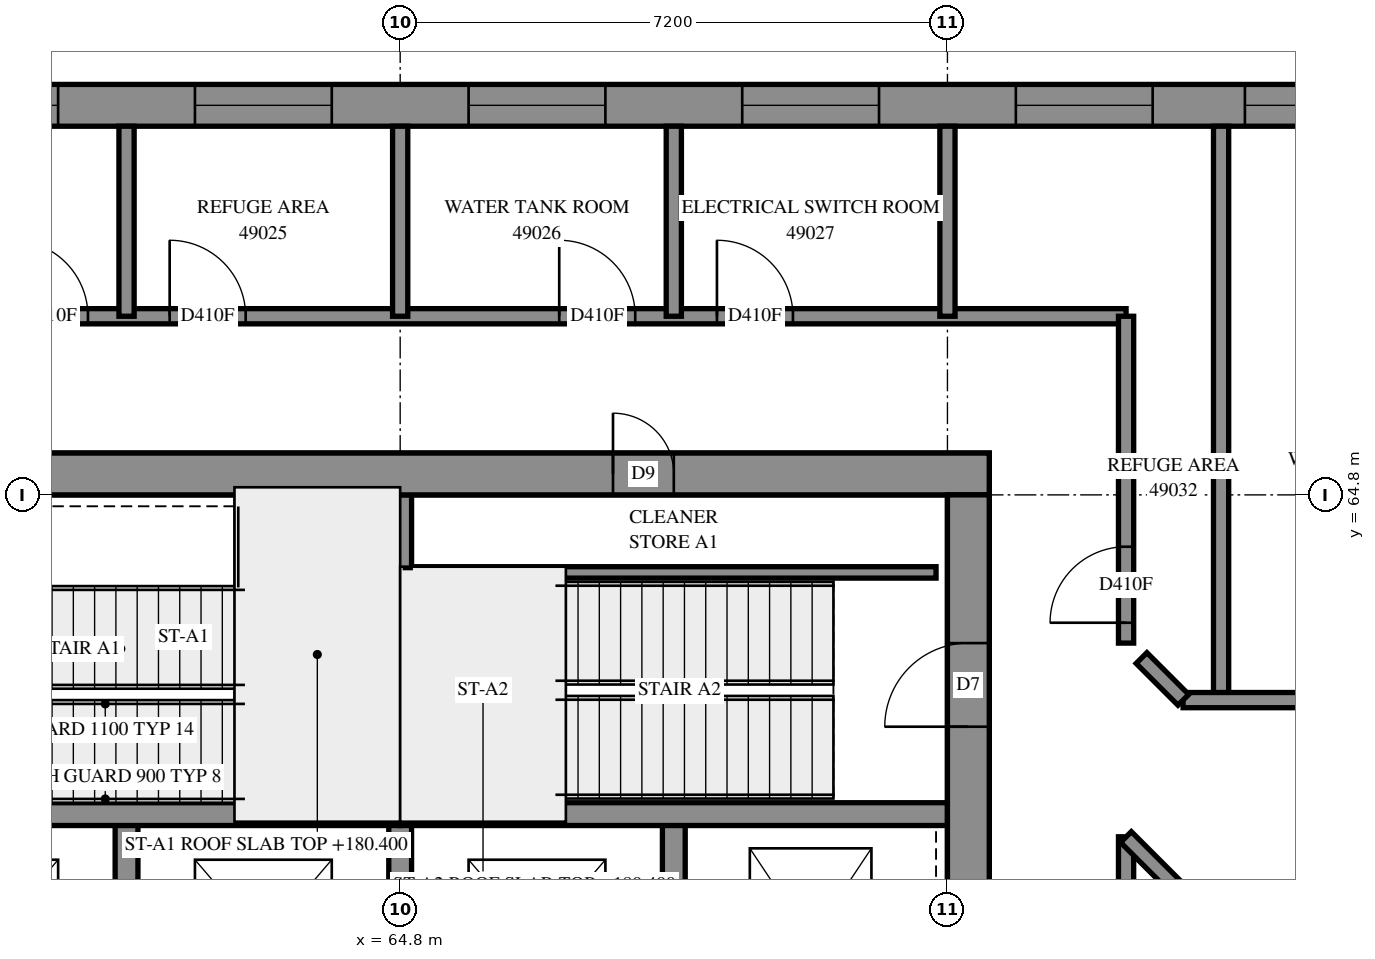
"""IFC4 building model, lengths in metres.
Left out: names, types, materials, properties, quantities, classifications, styles, units other than length and angle.
Written with IfcOpenShell. Run it as: python <this file> out.ifc"""

import sys

from ifc_helpers import new_model, si_unit, direction, frame, frame_2d, origin, place, context, subcontext, project, spatial, polyline, rectangle, outline, extrude, element, fill, save


model = new_model("IFC4")
c1 = context("Model", 3, precision=1e-05, world=origin(), true_north=direction((0.0, 1.0)))
c2 = subcontext(c1, "Body", "Model", "MODEL_VIEW")
j1 = project(units=[si_unit("LENGTHUNIT", "METRE"), si_unit("PLANEANGLEUNIT", "RADIAN")], contexts=[c1])
p1 = place(None, origin())
s1 = spatial("IfcSite", under=j1, at=p1, CompositionType="ELEMENT")
p2 = place(p1, origin())
s2 = spatial("IfcBuilding", under=s1, at=p2, CompositionType="ELEMENT")
p3 = place(p2, frame((0.0, 0.0, 180.4)))
s3 = spatial("IfcBuildingStorey", under=s2, at=p3, CompositionType="ELEMENT", Elevation=180.4)
p4 = place(p3, frame((57.05, 65.075, -0.3), z_axis=(0.0, 0.0, 1.0), x_axis=(1.0, 0.0, 0.0)))
e1 = element("IfcWall", 1, at=p4, inside=s3, PredefinedType="SHEAR", context=c2, shape_type="SweptSolid", body=[
    extrude(rectangle(XDim=15.5, YDim=0.55, at=frame_2d((7.75, 0.0))), origin(), (0.0, 0.0, 1.0), 4.3),
])
p5 = place(p4, frame((10.55, 0.0, 0.3)))
e2 = element("IfcOpeningElement", 2, at=p5, cuts=e1, PredefinedType="OPENING", context=c2, shape_type="SweptSolid", body=[
    extrude(rectangle(XDim=0.8, YDim=2.1, at=frame_2d((0.4, 1.05))), frame((0.0, 0.285, 0.0), z_axis=(0.0, -1.0, 0.0), x_axis=(1.0, 0.0, 0.0)), (0.0, 0.0, 1.0), 0.57),
])
p6 = place(p3, frame((72.275, 50.4, -0.3), z_axis=(0.0, 0.0, 1.0), x_axis=(0.0, 1.0, 0.0)))
e3 = element("IfcWall", 3, at=p6, inside=s3, PredefinedType="SHEAR", context=c2, shape_type="SweptSolid", body=[
    extrude(rectangle(XDim=14.4, YDim=0.55, at=frame_2d((7.2, 0.0))), origin(), (0.0, 0.0, 1.0), 4.3),
])
p7 = place(p6, frame((4.55, 0.0, 0.3)))
e4 = element("IfcOpeningElement", 4, at=p7, cuts=e3, PredefinedType="OPENING", context=c2, shape_type="SweptSolid", body=[
    extrude(rectangle(XDim=1.1, YDim=2.1, at=frame_2d((0.55, 1.05))), frame((0.0, 0.285, 0.0), z_axis=(0.0, -1.0, 0.0), x_axis=(1.0, 0.0, 0.0)), (0.0, 0.0, 1.0), 0.57),
])
p8 = place(p6, frame((11.35, 0.0, 0.3)))
e5 = element("IfcOpeningElement", 5, at=p8, cuts=e3, PredefinedType="OPENING", context=c2, shape_type="SweptSolid", body=[
    extrude(rectangle(XDim=1.1, YDim=2.1, at=frame_2d((0.55, 1.05))), frame((0.0, 0.285, 0.0), z_axis=(0.0, -1.0, 0.0), x_axis=(1.0, 0.0, 0.0)), (0.0, 0.0, 1.0), 0.57),
])
for number, where, z_axis, x_axis in (
    (6, (61.2, 57.3, 0.0), (0.0, 0.0, 1.0), (0.0, 1.0, 0.0)),
    (7, (64.8, 57.3, 0.0), (0.0, 0.0, 1.0), (0.0, 1.0, 0.0)),
    (8, (68.4, 57.3, 0.0), (0.0, 0.0, 1.0), (0.0, 1.0, 0.0)),
):
    element("IfcWall", number, at=place(p3, frame(where, z_axis=z_axis, x_axis=x_axis)), inside=s3, PredefinedType="SOLIDWALL", context=c2, shape_type="SweptSolid", body=[
        extrude(rectangle(XDim=3.3, YDim=0.3, at=frame_2d((1.65, 0.0))), origin(), (0.0, 0.0, 1.0), 4.7),
    ])
for number, where, z_axis, x_axis in (
    (9, (57.6, 60.6, 0.0), (0.0, 0.0, 1.0), (1.0, 0.0, 0.0)),
    (10, (64.8, 60.6, 0.0), (0.0, 0.0, 1.0), (1.0, 0.0, 0.0)),
):
    element("IfcWall", number, at=place(p3, frame(where, z_axis=z_axis, x_axis=x_axis)), inside=s3, PredefinedType="SOLIDWALL", context=c2, shape_type="SweptSolid", body=[
        extrude(rectangle(XDim=7.2, YDim=0.3, at=frame_2d((3.6, 0.0))), origin(), (0.0, 0.0, 1.0), 4.7),
    ])
p9 = place(p3, frame((64.8, 60.6, 0.0), z_axis=(0.0, 0.0, 1.0), x_axis=(0.0, 1.0, 0.0)))
e11 = element("IfcWall", 11, at=p9, inside=s3, PredefinedType="SOLIDWALL", context=c2, shape_type="SweptSolid", body=[
    extrude(rectangle(XDim=4.2, YDim=0.3, at=frame_2d((2.1, 0.0))), origin(), (0.0, 0.0, 1.0), 4.7),
])
p10 = place(p3, frame((78.341, 69.925, 0.0), z_axis=(0.0, 0.0, 1.0), x_axis=(-1.0, 0.0, 0.0)))
e12 = element("IfcWall", 12, at=p10, inside=s3, PredefinedType="SOLIDWALL", context=c2, shape_type="SweptSolid", body=[
    extrude(outline(polyline([(-0.114, -0.275), (54.941, -0.275), (54.391, 0.275), (0.114, 0.275), (-0.114, -0.275)])), origin(), (0.0, 0.0, 1.0), 4.7),
])
p11 = place(p10, frame((0.627, 0.0, 0.9)))
e13 = element("IfcOpeningElement", 13, at=p11, cuts=e12, PredefinedType="OPENING", context=c2, shape_type="SweptSolid", body=[
    extrude(rectangle(XDim=1.8, YDim=3.6, at=frame_2d((0.9, 1.8))), frame((0.0, 0.285, 0.0), z_axis=(0.0, -1.0, 0.0), x_axis=(1.0, 0.0, 0.0)), (0.0, 0.0, 1.0), 0.57),
])
p12 = place(p10, frame((3.64, 0.0, 0.9)))
e14 = element("IfcOpeningElement", 14, at=p12, cuts=e12, PredefinedType="OPENING", context=c2, shape_type="SweptSolid", body=[
    extrude(rectangle(XDim=1.8, YDim=3.6, at=frame_2d((0.9, 1.8))), frame((0.0, 0.285, 0.0), z_axis=(0.0, -1.0, 0.0), x_axis=(1.0, 0.0, 0.0)), (0.0, 0.0, 1.0), 0.57),
])
p13 = place(p10, frame((7.24, 0.0, 0.9)))
e15 = element("IfcOpeningElement", 15, at=p13, cuts=e12, PredefinedType="OPENING", context=c2, shape_type="SweptSolid", body=[
    extrude(rectangle(XDim=1.8, YDim=3.6, at=frame_2d((0.9, 1.8))), frame((0.0, 0.285, 0.0), z_axis=(0.0, -1.0, 0.0), x_axis=(1.0, 0.0, 0.0)), (0.0, 0.0, 1.0), 0.57),
])
p14 = place(p10, frame((10.841, 0.0, 0.9)))
e16 = element("IfcOpeningElement", 16, at=p14, cuts=e12, PredefinedType="OPENING", context=c2, shape_type="SweptSolid", body=[
    extrude(rectangle(XDim=1.8, YDim=3.6, at=frame_2d((0.9, 1.8))), frame((0.0, 0.285, 0.0), z_axis=(0.0, -1.0, 0.0), x_axis=(1.0, 0.0, 0.0)), (0.0, 0.0, 1.0), 0.57),
])
p15 = place(p10, frame((14.441, 0.0, 0.9)))
e17 = element("IfcOpeningElement", 17, at=p15, cuts=e12, PredefinedType="OPENING", context=c2, shape_type="SweptSolid", body=[
    extrude(rectangle(XDim=1.8, YDim=3.6, at=frame_2d((0.9, 1.8))), frame((0.0, 0.285, 0.0), z_axis=(0.0, -1.0, 0.0), x_axis=(1.0, 0.0, 0.0)), (0.0, 0.0, 1.0), 0.57),
])
p16 = place(p10, frame((18.041, 0.0, 0.9)))
e18 = element("IfcOpeningElement", 18, at=p16, cuts=e12, PredefinedType="OPENING", context=c2, shape_type="SweptSolid", body=[
    extrude(rectangle(XDim=1.8, YDim=3.6, at=frame_2d((0.9, 1.8))), frame((0.0, 0.285, 0.0), z_axis=(0.0, -1.0, 0.0), x_axis=(1.0, 0.0, 0.0)), (0.0, 0.0, 1.0), 0.57),
])
p17 = place(p10, frame((21.64, 0.0, 0.9)))
e19 = element("IfcOpeningElement", 19, at=p17, cuts=e12, PredefinedType="OPENING", context=c2, shape_type="SweptSolid", body=[
    extrude(rectangle(XDim=1.8, YDim=3.6, at=frame_2d((0.9, 1.8))), frame((0.0, 0.285, 0.0), z_axis=(0.0, -1.0, 0.0), x_axis=(1.0, 0.0, 0.0)), (0.0, 0.0, 1.0), 0.57),
])
p18 = place(p10, frame((25.241, 0.0, 0.9)))
e20 = element("IfcOpeningElement", 20, at=p18, cuts=e12, PredefinedType="OPENING", context=c2, shape_type="SweptSolid", body=[
    extrude(rectangle(XDim=1.8, YDim=3.6, at=frame_2d((0.9, 1.8))), frame((0.0, 0.285, 0.0), z_axis=(0.0, -1.0, 0.0), x_axis=(1.0, 0.0, 0.0)), (0.0, 0.0, 1.0), 0.57),
])
p19 = place(p10, frame((28.84, 0.0, 0.9)))
e21 = element("IfcOpeningElement", 21, at=p19, cuts=e12, PredefinedType="OPENING", context=c2, shape_type="SweptSolid", body=[
    extrude(rectangle(XDim=1.8, YDim=3.6, at=frame_2d((0.9, 1.8))), frame((0.0, 0.285, 0.0), z_axis=(0.0, -1.0, 0.0), x_axis=(1.0, 0.0, 0.0)), (0.0, 0.0, 1.0), 0.57),
])
p20 = place(p10, frame((32.441, 0.0, 0.9)))
e22 = element("IfcOpeningElement", 22, at=p20, cuts=e12, PredefinedType="OPENING", context=c2, shape_type="SweptSolid", body=[
    extrude(rectangle(XDim=1.8, YDim=3.6, at=frame_2d((0.9, 1.8))), frame((0.0, 0.285, 0.0), z_axis=(0.0, -1.0, 0.0), x_axis=(1.0, 0.0, 0.0)), (0.0, 0.0, 1.0), 0.57),
])
p21 = place(p10, frame((36.041, 0.0, 0.9)))
e23 = element("IfcOpeningElement", 23, at=p21, cuts=e12, PredefinedType="OPENING", context=c2, shape_type="SweptSolid", body=[
    extrude(rectangle(XDim=1.8, YDim=3.6, at=frame_2d((0.9, 1.8))), frame((0.0, 0.285, 0.0), z_axis=(0.0, -1.0, 0.0), x_axis=(1.0, 0.0, 0.0)), (0.0, 0.0, 1.0), 0.57),
])
p22 = place(p10, frame((39.641, 0.0, 0.9)))
e24 = element("IfcOpeningElement", 24, at=p22, cuts=e12, PredefinedType="OPENING", context=c2, shape_type="SweptSolid", body=[
    extrude(rectangle(XDim=1.8, YDim=3.6, at=frame_2d((0.9, 1.8))), frame((0.0, 0.285, 0.0), z_axis=(0.0, -1.0, 0.0), x_axis=(1.0, 0.0, 0.0)), (0.0, 0.0, 1.0), 0.57),
])
p23 = place(p10, frame((43.24, 0.0, 0.9)))
e25 = element("IfcOpeningElement", 25, at=p23, cuts=e12, PredefinedType="OPENING", context=c2, shape_type="SweptSolid", body=[
    extrude(rectangle(XDim=1.8, YDim=3.6, at=frame_2d((0.9, 1.8))), frame((0.0, 0.285, 0.0), z_axis=(0.0, -1.0, 0.0), x_axis=(1.0, 0.0, 0.0)), (0.0, 0.0, 1.0), 0.57),
])
p24 = place(p10, frame((46.84, 0.0, 0.9)))
e26 = element("IfcOpeningElement", 26, at=p24, cuts=e12, PredefinedType="OPENING", context=c2, shape_type="SweptSolid", body=[
    extrude(rectangle(XDim=1.8, YDim=3.6, at=frame_2d((0.9, 1.8))), frame((0.0, 0.285, 0.0), z_axis=(0.0, -1.0, 0.0), x_axis=(1.0, 0.0, 0.0)), (0.0, 0.0, 1.0), 0.57),
])
p25 = place(p10, frame((50.441, 0.0, 0.9)))
e27 = element("IfcOpeningElement", 27, at=p25, cuts=e12, PredefinedType="OPENING", context=c2, shape_type="SweptSolid", body=[
    extrude(rectangle(XDim=1.8, YDim=3.6, at=frame_2d((0.9, 1.8))), frame((0.0, 0.285, 0.0), z_axis=(0.0, -1.0, 0.0), x_axis=(1.0, 0.0, 0.0)), (0.0, 0.0, 1.0), 0.57),
])
p26 = place(p3, frame((64.95, 63.78, 0.0), z_axis=(0.0, 0.0, 1.0), x_axis=(1.0, 0.0, 0.0)))
e28 = element("IfcWall", 28, at=p26, inside=s3, PredefinedType="PARTITIONING", context=c2, shape_type="SweptSolid", body=[
    extrude(rectangle(XDim=6.9, YDim=0.15, at=frame_2d((3.45, 0.0))), origin(), (0.0, 0.0, 1.0), 4.7),
])
p27 = place(p3, frame((55.25, 67.15, 0.0), z_axis=(0.0, 0.0, 1.0), x_axis=(1.0, 0.0, 0.0)))
e29 = element("IfcWall", 29, at=p27, inside=s3, PredefinedType="PARTITIONING", context=c2, shape_type="SweptSolid", body=[
    extrude(rectangle(XDim=19.1, YDim=0.2, at=frame_2d((9.55, 0.0))), origin(), (0.0, 0.0, 1.0), 4.7),
])
p28 = place(p27, frame((4.442, 0.0, 0.0)))
e30 = element("IfcOpeningElement", 30, at=p28, cuts=e29, PredefinedType="OPENING", context=c2, shape_type="SweptSolid", body=[
    extrude(rectangle(XDim=1.0, YDim=2.1, at=frame_2d((0.5, 1.05))), frame((0.0, 0.11, 0.0), z_axis=(0.0, -1.0, 0.0), x_axis=(1.0, 0.0, 0.0)), (0.0, 0.0, 1.0), 0.22),
])
p29 = place(p27, frame((6.518, 0.0, 0.0)))
e31 = element("IfcOpeningElement", 31, at=p29, cuts=e29, PredefinedType="OPENING", context=c2, shape_type="SweptSolid", body=[
    extrude(rectangle(XDim=1.0, YDim=2.1, at=frame_2d((0.5, 1.05))), frame((0.0, 0.11, 0.0), z_axis=(0.0, -1.0, 0.0), x_axis=(1.0, 0.0, 0.0)), (0.0, 0.0, 1.0), 0.22),
])
p30 = place(p27, frame((11.643, 0.0, 0.0)))
e32 = element("IfcOpeningElement", 32, at=p30, cuts=e29, PredefinedType="OPENING", context=c2, shape_type="SweptSolid", body=[
    extrude(rectangle(XDim=1.0, YDim=2.1, at=frame_2d((0.5, 1.05))), frame((0.0, 0.11, 0.0), z_axis=(0.0, -1.0, 0.0), x_axis=(1.0, 0.0, 0.0)), (0.0, 0.0, 1.0), 0.22),
])
p31 = place(p27, frame((13.717, 0.0, 0.0)))
e33 = element("IfcOpeningElement", 33, at=p31, cuts=e29, PredefinedType="OPENING", context=c2, shape_type="SweptSolid", body=[
    extrude(rectangle(XDim=1.0, YDim=2.1, at=frame_2d((0.5, 1.05))), frame((0.0, 0.11, 0.0), z_axis=(0.0, -1.0, 0.0), x_axis=(1.0, 0.0, 0.0)), (0.0, 0.0, 1.0), 0.22),
])
p32 = place(p3, frame((75.6, 62.1, 0.0), z_axis=(0.0, 0.0, 1.0), x_axis=(0.0, 1.0, 0.0)))
e34 = element("IfcWall", 34, at=p32, inside=s3, PredefinedType="PARTITIONING", context=c2, shape_type="SweptSolid", body=[
    extrude(rectangle(XDim=7.55, YDim=0.2, at=frame_2d((3.775, 0.0))), origin(), (0.0, 0.0, 1.0), 4.7),
])
p33 = place(p3, frame((74.35, 54.9, 0.0), z_axis=(0.0, 0.0, 1.0), x_axis=(0.0, 1.0, 0.0)))
e35 = element("IfcWall", 35, at=p33, inside=s3, PredefinedType="PARTITIONING", context=c2, shape_type="SweptSolid", body=[
    extrude(rectangle(XDim=5.402, YDim=0.2, at=frame_2d((2.701, 0.0))), origin(), (0.0, 0.0, 1.0), 4.7),
])
p34 = place(p3, frame((74.349, 60.299, 0.0), z_axis=(0.0, 0.0, 1.0), x_axis=(0.7071067812, -0.7071067812, 0.0)))
e36 = element("IfcWall", 36, at=p34, inside=s3, PredefinedType="PARTITIONING", context=c2, shape_type="SweptSolid", body=[
    extrude(rectangle(XDim=4.452, YDim=0.2, at=frame_2d((2.226, 0.0))), origin(), (0.0, 0.0, 1.0), 4.7),
])
p35 = place(p3, frame((74.35, 62.85, 0.0), z_axis=(0.0, 0.0, 1.0), x_axis=(0.0, 1.0, 0.0)))
e37 = element("IfcWall", 37, at=p35, inside=s3, PredefinedType="PARTITIONING", context=c2, shape_type="SweptSolid", body=[
    extrude(rectangle(XDim=4.3, YDim=0.2, at=frame_2d((2.15, 0.0))), origin(), (0.0, 0.0, 1.0), 4.7),
])
p36 = place(p35, frame((0.268, 0.0, 0.0)))
e38 = element("IfcOpeningElement", 38, at=p36, cuts=e37, PredefinedType="OPENING", context=c2, shape_type="SweptSolid", body=[
    extrude(rectangle(XDim=1.0, YDim=2.1, at=frame_2d((0.5, 1.05))), frame((0.0, 0.11, 0.0), z_axis=(0.0, -1.0, 0.0), x_axis=(1.0, 0.0, 0.0)), (0.0, 0.0, 1.0), 0.22),
])
p37 = place(p3, frame((75.1, 62.1, 0.0), z_axis=(0.0, 0.0, 1.0), x_axis=(1.0, 0.0, 0.0)))
e39 = element("IfcWall", 39, at=p37, inside=s3, PredefinedType="PARTITIONING", context=c2, shape_type="SweptSolid", body=[
    extrude(rectangle(XDim=4.1, YDim=0.2, at=frame_2d((2.05, 0.0))), origin(), (0.0, 0.0, 1.0), 4.7),
])
for number, where, z_axis, x_axis in (
    (40, (61.2, 67.15, 0.0), (0.0, 0.0, 1.0), (0.0, 1.0, 0.0)),
    (41, (64.8, 67.15, 0.0), (0.0, 0.0, 1.0), (0.0, 1.0, 0.0)),
    (42, (68.4, 67.15, 0.0), (0.0, 0.0, 1.0), (0.0, 1.0, 0.0)),
    (43, (72.0, 67.15, 0.0), (0.0, 0.0, 1.0), (0.0, 1.0, 0.0)),
):
    element("IfcWall", number, at=place(p3, frame(where, z_axis=z_axis, x_axis=x_axis)), inside=s3, PredefinedType="PARTITIONING", context=c2, shape_type="SweptSolid", body=[
        extrude(rectangle(XDim=2.5, YDim=0.2, at=frame_2d((1.25, 0.0))), origin(), (0.0, 0.0, 1.0), 4.7),
    ])
p38 = place(p3, frame((74.553, 62.654, 0.0), z_axis=(0.0, 0.0, 1.0), x_axis=(0.7071067812, -0.7071067812, 0.0)))
e44 = element("IfcWall", 44, at=p38, inside=s3, PredefinedType="PARTITIONING", context=c2, shape_type="SweptSolid", body=[
    extrude(rectangle(XDim=0.778, YDim=0.2, at=frame_2d((0.389, 0.0))), origin(), (0.0, 0.0, 1.0), 4.7),
])
p39 = place(p11, origin())
e45 = element("IfcWindow", 45, at=p39, inside=s3, PartitioningType="SINGLE_PANEL", PredefinedType="WINDOW", context=c2, shape_type="SweptSolid", body=[
    extrude(rectangle(XDim=1.8, YDim=3.6, at=frame_2d((0.9, 1.8))), frame((0.0, 0.155, 0.0), z_axis=(0.0, -1.0, 0.0), x_axis=(1.0, 0.0, 0.0)), (0.0, 0.0, 1.0), 0.06),
])
fill(e13, e45)
p40 = place(p12, origin())
e46 = element("IfcWindow", 46, at=p40, inside=s3, PartitioningType="SINGLE_PANEL", PredefinedType="WINDOW", context=c2, shape_type="SweptSolid", body=[
    extrude(rectangle(XDim=1.8, YDim=3.6, at=frame_2d((0.9, 1.8))), frame((0.0, 0.155, 0.0), z_axis=(0.0, -1.0, 0.0), x_axis=(1.0, 0.0, 0.0)), (0.0, 0.0, 1.0), 0.06),
])
fill(e14, e46)
p41 = place(p13, origin())
e47 = element("IfcWindow", 47, at=p41, inside=s3, PartitioningType="SINGLE_PANEL", PredefinedType="WINDOW", context=c2, shape_type="SweptSolid", body=[
    extrude(rectangle(XDim=1.8, YDim=3.6, at=frame_2d((0.9, 1.8))), frame((0.0, 0.155, 0.0), z_axis=(0.0, -1.0, 0.0), x_axis=(1.0, 0.0, 0.0)), (0.0, 0.0, 1.0), 0.06),
])
fill(e15, e47)
p42 = place(p14, origin())
e48 = element("IfcWindow", 48, at=p42, inside=s3, PartitioningType="SINGLE_PANEL", PredefinedType="WINDOW", context=c2, shape_type="SweptSolid", body=[
    extrude(rectangle(XDim=1.8, YDim=3.6, at=frame_2d((0.9, 1.8))), frame((0.0, 0.155, 0.0), z_axis=(0.0, -1.0, 0.0), x_axis=(1.0, 0.0, 0.0)), (0.0, 0.0, 1.0), 0.06),
])
fill(e16, e48)
p43 = place(p15, origin())
e49 = element("IfcWindow", 49, at=p43, inside=s3, PartitioningType="SINGLE_PANEL", PredefinedType="WINDOW", context=c2, shape_type="SweptSolid", body=[
    extrude(rectangle(XDim=1.8, YDim=3.6, at=frame_2d((0.9, 1.8))), frame((0.0, 0.155, 0.0), z_axis=(0.0, -1.0, 0.0), x_axis=(1.0, 0.0, 0.0)), (0.0, 0.0, 1.0), 0.06),
])
fill(e17, e49)
p44 = place(p16, origin())
e50 = element("IfcWindow", 50, at=p44, inside=s3, PartitioningType="SINGLE_PANEL", PredefinedType="WINDOW", context=c2, shape_type="SweptSolid", body=[
    extrude(rectangle(XDim=1.8, YDim=3.6, at=frame_2d((0.9, 1.8))), frame((0.0, 0.155, 0.0), z_axis=(0.0, -1.0, 0.0), x_axis=(1.0, 0.0, 0.0)), (0.0, 0.0, 1.0), 0.06),
])
fill(e18, e50)
p45 = place(p5, origin())
e51 = element("IfcDoor", 51, at=p45, inside=s3, OperationType="SINGLE_SWING_RIGHT", PredefinedType="DOOR", context=c2, shape_type="SweptSolid", body=[
    extrude(rectangle(XDim=0.8, YDim=2.1, at=frame_2d((0.4, 1.05))), frame((0.0, 0.025, 0.0), z_axis=(0.0, -1.0, 0.0), x_axis=(1.0, 0.0, 0.0)), (0.0, 0.0, 1.0), 0.05),
])
fill(e2, e51)
p46 = place(p8, origin())
e52 = element("IfcDoor", 52, at=p46, inside=s3, OperationType="SINGLE_SWING_RIGHT", PredefinedType="DOOR", context=c2, shape_type="SweptSolid", body=[
    extrude(rectangle(XDim=1.1, YDim=2.1, at=frame_2d((0.55, 1.05))), frame((0.0, 0.025, 0.0), z_axis=(0.0, -1.0, 0.0), x_axis=(1.0, 0.0, 0.0)), (0.0, 0.0, 1.0), 0.05),
])
fill(e5, e52)
p47 = place(p28, origin())
e53 = element("IfcDoor", 53, at=p47, inside=s3, OperationType="SINGLE_SWING_RIGHT", PredefinedType="DOOR", context=c2, shape_type="SweptSolid", body=[
    extrude(rectangle(XDim=1.0, YDim=2.1, at=frame_2d((0.5, 1.05))), frame((0.0, 0.025, 0.0), z_axis=(0.0, -1.0, 0.0), x_axis=(1.0, 0.0, 0.0)), (0.0, 0.0, 1.0), 0.05),
])
fill(e30, e53)
p48 = place(p29, origin())
e54 = element("IfcDoor", 54, at=p48, inside=s3, OperationType="SINGLE_SWING_LEFT", PredefinedType="DOOR", context=c2, shape_type="SweptSolid", body=[
    extrude(rectangle(XDim=1.0, YDim=2.1, at=frame_2d((0.5, 1.05))), frame((0.0, 0.025, 0.0), z_axis=(0.0, -1.0, 0.0), x_axis=(1.0, 0.0, 0.0)), (0.0, 0.0, 1.0), 0.05),
])
fill(e31, e54)
p49 = place(p30, origin())
e55 = element("IfcDoor", 55, at=p49, inside=s3, OperationType="SINGLE_SWING_RIGHT", PredefinedType="DOOR", context=c2, shape_type="SweptSolid", body=[
    extrude(rectangle(XDim=1.0, YDim=2.1, at=frame_2d((0.5, 1.05))), frame((0.0, 0.025, 0.0), z_axis=(0.0, -1.0, 0.0), x_axis=(1.0, 0.0, 0.0)), (0.0, 0.0, 1.0), 0.05),
])
fill(e32, e55)
p50 = place(p31, origin())
e56 = element("IfcDoor", 56, at=p50, inside=s3, OperationType="SINGLE_SWING_LEFT", PredefinedType="DOOR", context=c2, shape_type="SweptSolid", body=[
    extrude(rectangle(XDim=1.0, YDim=2.1, at=frame_2d((0.5, 1.05))), frame((0.0, 0.025, 0.0), z_axis=(0.0, -1.0, 0.0), x_axis=(1.0, 0.0, 0.0)), (0.0, 0.0, 1.0), 0.05),
])
fill(e33, e56)
p51 = place(p36, origin())
e57 = element("IfcDoor", 57, at=p51, inside=s3, OperationType="SINGLE_SWING_RIGHT", PredefinedType="DOOR", context=c2, shape_type="SweptSolid", body=[
    extrude(rectangle(XDim=1.0, YDim=2.1, at=frame_2d((0.5, 1.05))), frame((0.0, 0.025, 0.0), z_axis=(0.0, -1.0, 0.0), x_axis=(1.0, 0.0, 0.0)), (0.0, 0.0, 1.0), 0.05),
])
fill(e38, e57)
save(model, sys.argv[1])
